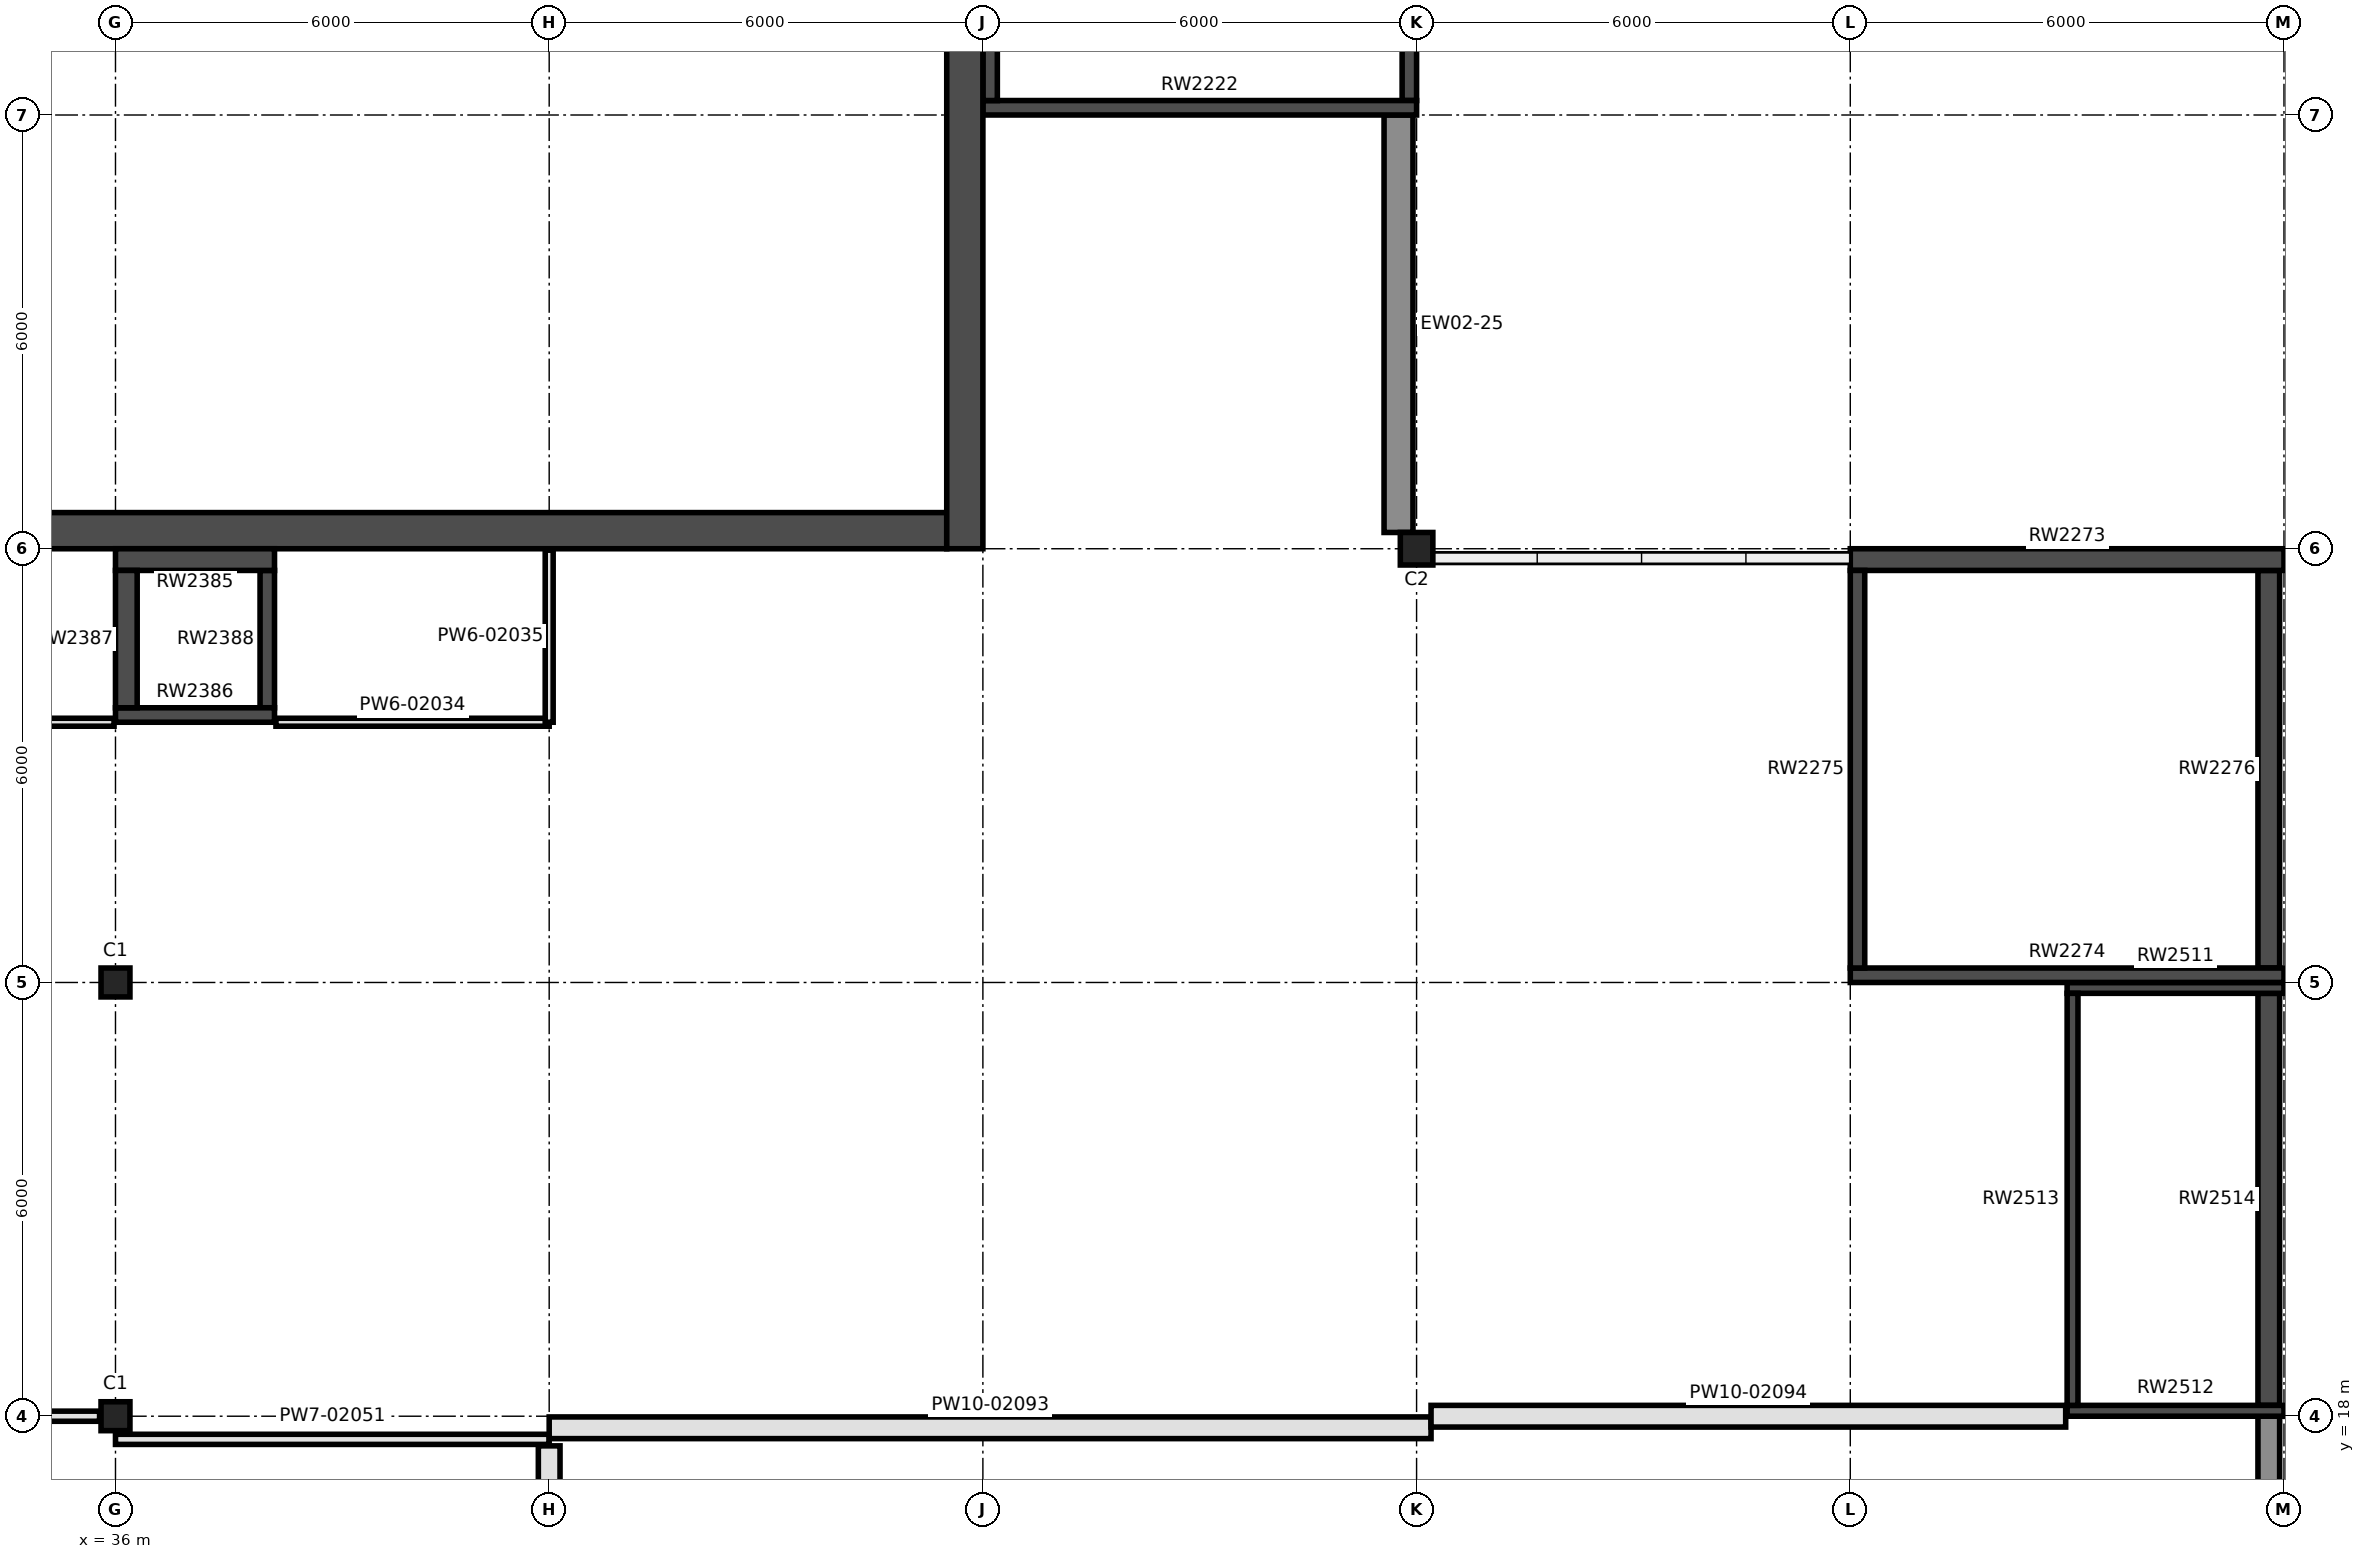
"""IFC4 building model, lengths in metres.
Left out: names, types, materials, properties, quantities, classifications, styles, units other than length and angle.
Written with IfcOpenShell. Run it as: python <this file> out.ifc"""

import sys

from ifc_helpers import new_model, si_unit, direction, frame, frame_2d, origin, origin_2d, place, context, subcontext, project, spatial, rectangle, extrude, element, fill, save


model = new_model("IFC4")
c1 = context("Model", 3, precision=1e-05, world=origin(), true_north=direction((0.0, 1.0)))
c2 = subcontext(c1, "Body", "Model", "MODEL_VIEW")
j1 = project(units=[si_unit("LENGTHUNIT", "METRE"), si_unit("PLANEANGLEUNIT", "RADIAN")], contexts=[c1])
p1 = place(None, origin())
s1 = spatial("IfcSite", under=j1, at=p1, CompositionType="ELEMENT")
p2 = place(p1, origin())
s2 = spatial("IfcBuilding", under=s1, at=p2, CompositionType="ELEMENT")
p3 = place(p2, frame((0.0, 0.0, 12.0)))
s3 = spatial("IfcBuildingStorey", under=s2, at=p3, CompositionType="ELEMENT", Elevation=12.0)
for number, where, z_axis, x_axis in (
    (1, (36.0, 18.0, 0.0), (0.0, 0.0, 1.0), (1.0, 0.0, 0.0)),
    (2, (36.0, 24.0, 0.0), (0.0, 0.0, 1.0), (1.0, 0.0, 0.0)),
):
    element("IfcColumn", number, at=place(p3, frame(where, z_axis=z_axis, x_axis=x_axis)), inside=s3, PredefinedType="COLUMN", context=c2, shape_type="SweptSolid", body=[
        extrude(rectangle(XDim=0.4, YDim=0.4, at=origin_2d()), origin(), (0.0, 0.0, 1.0), 4.5),
    ])
p4 = place(p3, frame((54.0, 30.0, 0.0), z_axis=(0.0, 0.0, 1.0), x_axis=(1.0, 0.0, 0.0)))
e3 = element("IfcColumn", 3, at=p4, inside=s3, PredefinedType="COLUMN", context=c2, shape_type="SweptSolid", body=[
    extrude(rectangle(XDim=0.45, YDim=0.45, at=origin_2d()), origin(), (0.0, 0.0, 1.0), 4.5),
])
p5 = place(p3, frame((48.0, 36.1, 0.0), z_axis=(0.0, 0.0, 1.0), x_axis=(1.0, 0.0, 0.0)))
e4 = element("IfcWall", 4, at=p5, inside=s3, PredefinedType="SHEAR", context=c2, shape_type="SweptSolid", body=[
    extrude(rectangle(XDim=6.0, YDim=0.2, at=frame_2d((3.0, 0.0))), origin(), (0.0, 0.0, 1.0), 4.5),
])
p6 = place(p5, frame((4.6, 0.0, 0.0)))
e5 = element("IfcOpeningElement", 5, at=p6, cuts=e4, PredefinedType="OPENING", context=c2, shape_type="SweptSolid", body=[
    extrude(rectangle(XDim=1.1, YDim=2.2, at=frame_2d((0.55, 1.1))), frame((0.0, 0.11, 0.0), z_axis=(0.0, -1.0, 0.0), x_axis=(1.0, 0.0, 0.0)), (0.0, 0.0, 1.0), 0.22),
])
for number, where, z_axis, x_axis in (
    (6, (48.1, 36.2, 0.0), (0.0, 0.0, 1.0), (0.0, 1.0, 0.0)),
    (7, (53.9, 36.2, 0.0), (0.0, 0.0, 1.0), (0.0, 1.0, 0.0)),
):
    element("IfcWall", number, at=place(p3, frame(where, z_axis=z_axis, x_axis=x_axis)), inside=s3, PredefinedType="SHEAR", context=c2, shape_type="SweptSolid", body=[
        extrude(rectangle(XDim=5.6, YDim=0.2, at=frame_2d((2.8, 0.0))), origin(), (0.0, 0.0, 1.0), 4.5),
    ])
p7 = place(p3, frame((60.0, 29.85, 0.0), z_axis=(0.0, 0.0, 1.0), x_axis=(1.0, 0.0, 0.0)))
e8 = element("IfcWall", 8, at=p7, inside=s3, PredefinedType="SHEAR", context=c2, shape_type="SweptSolid", body=[
    extrude(rectangle(XDim=6.0, YDim=0.3, at=frame_2d((3.0, 0.0))), origin(), (0.0, 0.0, 1.0), 4.5),
])
p8 = place(p3, frame((60.0, 24.1, 0.0), z_axis=(0.0, 0.0, 1.0), x_axis=(1.0, 0.0, 0.0)))
e9 = element("IfcWall", 9, at=p8, inside=s3, PredefinedType="SHEAR", context=c2, shape_type="SweptSolid", body=[
    extrude(rectangle(XDim=6.0, YDim=0.2, at=frame_2d((3.0, 0.0))), origin(), (0.0, 0.0, 1.0), 4.5),
])
p9 = place(p3, frame((60.1, 24.2, 0.0), z_axis=(0.0, 0.0, 1.0), x_axis=(0.0, 1.0, 0.0)))
e10 = element("IfcWall", 10, at=p9, inside=s3, PredefinedType="SHEAR", context=c2, shape_type="SweptSolid", body=[
    extrude(rectangle(XDim=5.5, YDim=0.2, at=frame_2d((2.75, 0.0))), origin(), (0.0, 0.0, 1.0), 4.5),
])
p10 = place(p9, frame((1.9, 0.0, 0.0)))
e11 = element("IfcOpeningElement", 11, at=p10, cuts=e10, PredefinedType="OPENING", context=c2, shape_type="SweptSolid", body=[
    extrude(rectangle(XDim=1.8, YDim=2.2, at=frame_2d((0.9, 1.1))), frame((0.0, 0.11, 0.0), z_axis=(0.0, -1.0, 0.0), x_axis=(1.0, 0.0, 0.0)), (0.0, 0.0, 1.0), 0.22),
])
p11 = place(p3, frame((65.79, 24.2, 0.0), z_axis=(0.0, 0.0, 1.0), x_axis=(0.0, 1.0, 0.0)))
e12 = element("IfcWall", 12, at=p11, inside=s3, PredefinedType="SHEAR", context=c2, shape_type="SweptSolid", body=[
    extrude(rectangle(XDim=5.5, YDim=0.3, at=frame_2d((2.75, 0.0))), origin(), (0.0, 0.0, 1.0), 4.5),
])
p12 = place(p3, frame((36.0, 29.85, 0.0), z_axis=(0.0, 0.0, 1.0), x_axis=(1.0, 0.0, 0.0)))
e13 = element("IfcWall", 13, at=p12, inside=s3, PredefinedType="SHEAR", context=c2, shape_type="SweptSolid", body=[
    extrude(rectangle(XDim=2.2, YDim=0.3, at=frame_2d((1.1, 0.0))), origin(), (0.0, 0.0, 1.0), 4.5),
])
p13 = place(p3, frame((36.0, 27.7, 0.0), z_axis=(0.0, 0.0, 1.0), x_axis=(1.0, 0.0, 0.0)))
e14 = element("IfcWall", 14, at=p13, inside=s3, PredefinedType="SHEAR", context=c2, shape_type="SweptSolid", body=[
    extrude(rectangle(XDim=2.2, YDim=0.2, at=frame_2d((1.1, 0.0))), origin(), (0.0, 0.0, 1.0), 4.5),
])
p14 = place(p13, frame((0.55, 0.0, 0.0)))
e15 = element("IfcOpeningElement", 15, at=p14, cuts=e14, PredefinedType="OPENING", context=c2, shape_type="SweptSolid", body=[
    extrude(rectangle(XDim=1.1, YDim=2.1, at=frame_2d((0.55, 1.05))), frame((0.0, 0.11, 0.0), z_axis=(0.0, -1.0, 0.0), x_axis=(1.0, 0.0, 0.0)), (0.0, 0.0, 1.0), 0.22),
])
p15 = place(p3, frame((36.15, 27.8, 0.0), z_axis=(0.0, 0.0, 1.0), x_axis=(0.0, 1.0, 0.0)))
e16 = element("IfcWall", 16, at=p15, inside=s3, PredefinedType="SHEAR", context=c2, shape_type="SweptSolid", body=[
    extrude(rectangle(XDim=1.9, YDim=0.3, at=frame_2d((0.95, 0.0))), origin(), (0.0, 0.0, 1.0), 4.5),
])
p16 = place(p3, frame((38.1, 27.8, 0.0), z_axis=(0.0, 0.0, 1.0), x_axis=(0.0, 1.0, 0.0)))
e17 = element("IfcWall", 17, at=p16, inside=s3, PredefinedType="SHEAR", context=c2, shape_type="SweptSolid", body=[
    extrude(rectangle(XDim=1.9, YDim=0.2, at=frame_2d((0.95, 0.0))), origin(), (0.0, 0.0, 1.0), 4.5),
])
for number, where, z_axis, x_axis in (
    (18, (63.0, 23.925, 0.0), (0.0, 0.0, 1.0), (1.0, 0.0, 0.0)),
    (19, (63.0, 18.075, 0.0), (0.0, 0.0, 1.0), (1.0, 0.0, 0.0)),
):
    element("IfcWall", number, at=place(p3, frame(where, z_axis=z_axis, x_axis=x_axis)), inside=s3, PredefinedType="SHEAR", context=c2, shape_type="SweptSolid", body=[
        extrude(rectangle(XDim=3.0, YDim=0.15, at=frame_2d((1.5, 0.0))), origin(), (0.0, 0.0, 1.0), 4.5),
    ])
p17 = place(p3, frame((63.075, 18.15, 0.0), z_axis=(0.0, 0.0, 1.0), x_axis=(0.0, 1.0, 0.0)))
e20 = element("IfcWall", 20, at=p17, inside=s3, PredefinedType="SHEAR", context=c2, shape_type="SweptSolid", body=[
    extrude(rectangle(XDim=5.7, YDim=0.15, at=frame_2d((2.85, 0.0))), origin(), (0.0, 0.0, 1.0), 4.5),
])
p18 = place(p3, frame((65.79, 18.15, 0.0), z_axis=(0.0, 0.0, 1.0), x_axis=(0.0, 1.0, 0.0)))
e21 = element("IfcWall", 21, at=p18, inside=s3, PredefinedType="SHEAR", context=c2, shape_type="SweptSolid", body=[
    extrude(rectangle(XDim=5.7, YDim=0.3, at=frame_2d((2.85, 0.0))), origin(), (0.0, 0.0, 1.0), 4.5),
])
p19 = place(p3, frame((65.79, 0.0, 0.0), z_axis=(0.0, 0.0, 1.0), x_axis=(0.0, 1.0, 0.0)))
e22 = element("IfcWall", 22, at=p19, inside=s3, PredefinedType="SOLIDWALL", context=c2, shape_type="SweptSolid", body=[
    extrude(rectangle(XDim=18.0, YDim=0.3, at=frame_2d((9.0, 0.0))), origin(), (0.0, 0.0, 1.0), 4.5),
])
p20 = place(p3, frame((47.75, 30.0, 0.0), z_axis=(0.0, 0.0, 1.0), x_axis=(0.0, 1.0, 0.0)))
e23 = element("IfcWall", 23, at=p20, inside=s3, PredefinedType="SHEAR", context=c2, shape_type="SweptSolid", body=[
    extrude(rectangle(XDim=24.0, YDim=0.5, at=frame_2d((12.0, 0.0))), origin(), (0.0, 0.0, 1.0), 4.5),
])
p21 = place(p3, frame((18.5, 30.25, 0.0), z_axis=(0.0, 0.0, 1.0), x_axis=(1.0, 0.0, 0.0)))
e24 = element("IfcWall", 24, at=p21, inside=s3, PredefinedType="SHEAR", context=c2, shape_type="SweptSolid", body=[
    extrude(rectangle(XDim=29.0, YDim=0.5, at=frame_2d((14.5, 0.0))), origin(), (0.0, 0.0, 1.0), 4.5),
])
p22 = place(p3, frame((53.75, 36.0, 0.0), z_axis=(0.0, 0.0, 1.0), x_axis=(0.0, -1.0, 0.0)))
e25 = element("IfcWall", 25, at=p22, inside=s3, PredefinedType="SOLIDWALL", context=c2, shape_type="SweptSolid", body=[
    extrude(rectangle(XDim=5.775, YDim=0.4, at=frame_2d((2.887, 0.0))), origin(), (0.0, 0.0, 1.0), 3.55),
])
p23 = place(p3, frame((32.22, 27.6, 0.0), z_axis=(0.0, 0.0, 1.0), x_axis=(1.0, 0.0, 0.0)))
e26 = element("IfcWall", 26, at=p23, inside=s3, PredefinedType="PARTITIONING", context=c2, shape_type="SweptSolid", body=[
    extrude(rectangle(XDim=3.76, YDim=0.11, at=frame_2d((1.88, 0.0))), origin(), (0.0, 0.0, 1.0), 4.28),
])
p24 = place(p23, frame((1.53, 0.0, 0.0)))
e27 = element("IfcOpeningElement", 27, at=p24, cuts=e26, PredefinedType="OPENING", context=c2, shape_type="SweptSolid", body=[
    extrude(rectangle(XDim=0.75, YDim=2.04, at=frame_2d((0.375, 1.02))), frame((0.0, 0.065, 0.0), z_axis=(0.0, -1.0, 0.0), x_axis=(1.0, 0.0, 0.0)), (0.0, 0.0, 1.0), 0.13),
])
p25 = place(p3, frame((38.22, 27.6, 0.0), z_axis=(0.0, 0.0, 1.0), x_axis=(1.0, 0.0, 0.0)))
e28 = element("IfcWall", 28, at=p25, inside=s3, PredefinedType="PARTITIONING", context=c2, shape_type="SweptSolid", body=[
    extrude(rectangle(XDim=3.78, YDim=0.11, at=frame_2d((1.89, 0.0))), origin(), (0.0, 0.0, 1.0), 4.28),
])
p26 = place(p25, frame((1.53, 0.0, 0.0)))
e29 = element("IfcOpeningElement", 29, at=p26, cuts=e28, PredefinedType="OPENING", context=c2, shape_type="SweptSolid", body=[
    extrude(rectangle(XDim=0.75, YDim=2.04, at=frame_2d((0.375, 1.02))), frame((0.0, 0.065, 0.0), z_axis=(0.0, -1.0, 0.0), x_axis=(1.0, 0.0, 0.0)), (0.0, 0.0, 1.0), 0.13),
])
p27 = place(p3, frame((42.0, 27.6, 0.0), z_axis=(0.0, 0.0, 1.0), x_axis=(0.0, 1.0, 0.0)))
e30 = element("IfcWall", 30, at=p27, inside=s3, PredefinedType="PARTITIONING", context=c2, shape_type="SweptSolid", body=[
    extrude(rectangle(XDim=2.38, YDim=0.11, at=frame_2d((1.19, 0.0))), origin(), (0.0, 0.0, 1.0), 4.28),
])
p28 = place(p3, frame((30.22, 18.0, 0.0), z_axis=(0.0, 0.0, 1.0), x_axis=(1.0, 0.0, 0.0)))
e31 = element("IfcWall", 31, at=p28, inside=s3, PredefinedType="PARTITIONING", context=c2, shape_type="SweptSolid", body=[
    extrude(rectangle(XDim=5.56, YDim=0.14, at=frame_2d((2.78, 0.0))), origin(), (0.0, 0.0, 1.0), 3.9),
])
p29 = place(p28, frame((0.33, 0.0, 0.0)))
e32 = element("IfcOpeningElement", 32, at=p29, cuts=e31, PredefinedType="OPENING", context=c2, shape_type="SweptSolid", body=[
    extrude(rectangle(XDim=1.8, YDim=2.1, at=frame_2d((0.9, 1.05))), frame((0.0, 0.08, 0.0), z_axis=(0.0, -1.0, 0.0), x_axis=(1.0, 0.0, 0.0)), (0.0, 0.0, 1.0), 0.16),
])
p30 = place(p28, frame((3.33, 0.0, 0.0)))
e33 = element("IfcOpeningElement", 33, at=p30, cuts=e31, PredefinedType="OPENING", context=c2, shape_type="SweptSolid", body=[
    extrude(rectangle(XDim=1.8, YDim=2.1, at=frame_2d((0.9, 1.05))), frame((0.0, 0.08, 0.0), z_axis=(0.0, -1.0, 0.0), x_axis=(1.0, 0.0, 0.0)), (0.0, 0.0, 1.0), 0.16),
])
p31 = place(p3, frame((36.0, 17.68, 0.0), z_axis=(0.0, 0.0, 1.0), x_axis=(1.0, 0.0, 0.0)))
e34 = element("IfcWall", 34, at=p31, inside=s3, PredefinedType="PARTITIONING", context=c2, shape_type="SweptSolid", body=[
    extrude(rectangle(XDim=6.0, YDim=0.14, at=frame_2d((3.0, 0.0))), origin(), (0.0, 0.0, 1.0), 4.28),
])
p32 = place(p3, frame((42.0, 17.84, 0.0), z_axis=(0.0, 0.0, 1.0), x_axis=(1.0, 0.0, 0.0)))
e35 = element("IfcWall", 35, at=p32, inside=s3, PredefinedType="PARTITIONING", context=c2, shape_type="SweptSolid", body=[
    extrude(rectangle(XDim=12.2, YDim=0.3, at=frame_2d((6.1, 0.0))), origin(), (0.0, 0.0, 1.0), 4.28),
])
p33 = place(p3, frame((54.2, 18.0, 0.0), z_axis=(0.0, 0.0, 1.0), x_axis=(1.0, 0.0, 0.0)))
e36 = element("IfcWall", 36, at=p33, inside=s3, PredefinedType="PARTITIONING", context=c2, shape_type="SweptSolid", body=[
    extrude(rectangle(XDim=8.78, YDim=0.3, at=frame_2d((4.39, 0.0))), origin(), (0.0, 0.0, 1.0), 4.28),
])
p34 = place(p3, frame((42.0, 6.02, 0.0), z_axis=(0.0, 0.0, 1.0), x_axis=(0.0, 1.0, 0.0)))
e37 = element("IfcWall", 37, at=p34, inside=s3, PredefinedType="PARTITIONING", context=c2, shape_type="SweptSolid", body=[
    extrude(rectangle(XDim=11.57, YDim=0.3, at=frame_2d((5.785, 0.0))), origin(), (0.0, 0.0, 1.0), 4.28),
])
p35 = place(p6, origin())
e38 = element("IfcDoor", 38, at=p35, inside=s3, OperationType="SINGLE_SWING_LEFT", PredefinedType="DOOR", context=c2, shape_type="SweptSolid", body=[
    extrude(rectangle(XDim=1.1, YDim=2.2, at=frame_2d((0.55, 1.1))), frame((0.0, 0.025, 0.0), z_axis=(0.0, -1.0, 0.0), x_axis=(1.0, 0.0, 0.0)), (0.0, 0.0, 1.0), 0.05),
])
fill(e5, e38)
p36 = place(p10, frame((1.8, 0.0, 0.0), z_axis=(0.0, 0.0, 1.0), x_axis=(-1.0, 0.0, 0.0)))
e39 = element("IfcDoor", 39, at=p36, inside=s3, OperationType="DOUBLE_DOOR_SINGLE_SWING", PredefinedType="DOOR", context=c2, shape_type="SweptSolid", body=[
    extrude(rectangle(XDim=1.8, YDim=2.2, at=frame_2d((0.9, 1.1))), frame((0.0, 0.025, 0.0), z_axis=(0.0, -1.0, 0.0), x_axis=(1.0, 0.0, 0.0)), (0.0, 0.0, 1.0), 0.05),
])
fill(e11, e39)
p37 = place(p26, origin())
e40 = element("IfcDoor", 40, at=p37, inside=s3, OperationType="SINGLE_SWING_LEFT", PredefinedType="DOOR", context=c2, shape_type="SweptSolid", body=[
    extrude(rectangle(XDim=0.75, YDim=2.04, at=frame_2d((0.375, 1.02))), frame((0.0, 0.025, 0.0), z_axis=(0.0, -1.0, 0.0), x_axis=(1.0, 0.0, 0.0)), (0.0, 0.0, 1.0), 0.05),
])
fill(e29, e40)
p38 = place(p30, origin())
e41 = element("IfcDoor", 41, at=p38, inside=s3, OperationType="DOUBLE_DOOR_SINGLE_SWING", PredefinedType="DOOR", context=c2, shape_type="SweptSolid", body=[
    extrude(rectangle(XDim=1.8, YDim=2.1, at=frame_2d((0.9, 1.05))), frame((0.0, 0.025, 0.0), z_axis=(0.0, -1.0, 0.0), x_axis=(1.0, 0.0, 0.0)), (0.0, 0.0, 1.0), 0.05),
])
fill(e33, e41)
p39 = place(p14, origin())
e42 = element("IfcDoor", 42, at=p39, inside=s3, OperationType="DOUBLE_DOOR_SLIDING", PredefinedType="DOOR", context=c2, shape_type="SweptSolid", body=[
    extrude(rectangle(XDim=1.1, YDim=2.1, at=frame_2d((0.55, 1.05))), frame((0.0, 0.025, 0.0), z_axis=(0.0, -1.0, 0.0), x_axis=(1.0, 0.0, 0.0)), (0.0, 0.0, 1.0), 0.05),
])
fill(e15, e42)
save(model, sys.argv[1])
